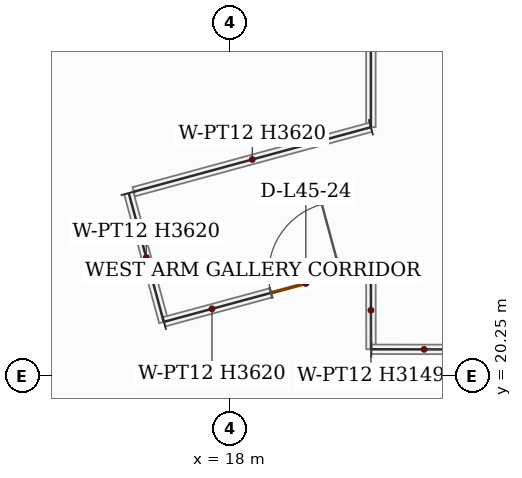
"""IFC4 building model, lengths in metres.
Left out: names, types, materials, properties, quantities, classifications, styles, units other than length and angle.
Written with IfcOpenShell. Run it as: python <this file> out.ifc"""

import sys

from ifc_helpers import new_model, si_unit, direction, frame, frame_2d, origin, place, context, subcontext, project, spatial, rectangle, extrude, source, transform, mapped, element, fill, save


model = new_model("IFC4")
c1 = context("Model", 3, precision=1e-05, world=origin(), true_north=direction((0.0, 1.0)))
c2 = subcontext(c1, "Body", "Model", "MODEL_VIEW")
j1 = project(units=[si_unit("LENGTHUNIT", "METRE"), si_unit("PLANEANGLEUNIT", "RADIAN")], contexts=[c1])
p1 = place(None, origin())
s1 = spatial("IfcSite", under=j1, at=p1, CompositionType="ELEMENT")
p2 = place(p1, origin())
s2 = spatial("IfcBuilding", under=s1, at=p2, CompositionType="ELEMENT")
p3 = place(p2, frame((0.0, 0.0, 194.1)))
s3 = spatial("IfcBuildingStorey", under=s2, at=p3, CompositionType="ELEMENT", Elevation=194.1)
m1 = source(origin(), c2, "Body", "SweptSolid", [
    extrude(rectangle(XDim=1.756, YDim=0.125, at=frame_2d((0.878, 0.0))), origin(), (0.0, 0.0, 1.0), 3.62),
])
p4 = place(p3, frame((16.665, 22.657, 0.0), z_axis=(0.0, 0.0, 1.0), x_axis=(0.262246637243, -0.965000881479, 0.0)))
e1 = element("IfcWall", 1, at=p4, inside=s3, PredefinedType="PARTITIONING", context=c2, shape_type="MappedRepresentation", body=[
    mapped(m1, transform((0.0, 0.0, 0.0), x_axis=(1.0, 0.0, 0.0), y_axis=(0.0, 1.0, 0.0), z_axis=(0.0, 0.0, 1.0), scale=1.0)),
])
p5 = place(p3, frame((17.127, 20.963, 0.0), z_axis=(0.0, 0.0, 1.0), x_axis=(0.965283220267, 0.261205483616, 0.0)))
e2 = element("IfcWall", 2, at=p5, inside=s3, PredefinedType="PARTITIONING", context=c2, shape_type="SweptSolid", body=[
    extrude(rectangle(XDim=2.821, YDim=0.125, at=frame_2d((1.41, 0.0))), origin(), (0.0, 0.0, 1.0), 3.62),
])
p6 = place(p5, frame((1.459, 0.0, 0.0)))
e3 = element("IfcOpeningElement", 3, at=p6, cuts=e2, PredefinedType="OPENING", context=c2, shape_type="SweptSolid", body=[
    extrude(rectangle(XDim=0.95, YDim=2.15, at=frame_2d((0.475, 1.075))), frame((0.0, 0.073, 0.0), z_axis=(0.0, -1.0, 0.0), x_axis=(1.0, 0.0, 0.0)), (0.0, 0.0, 1.0), 0.145),
])
m2 = source(origin(), c2, "Body", "SweptSolid", [
    extrude(rectangle(XDim=1.028, YDim=0.125, at=frame_2d((0.514, 0.0))), origin(), (0.0, 0.0, 1.0), 3.149),
])
p7 = place(p3, frame((19.85, 21.63, 0.0), z_axis=(0.0, 0.0, 1.0), x_axis=(0.001187365584, -0.999999295081, 0.0)))
e4 = element("IfcWall", 4, at=p7, inside=s3, PredefinedType="PARTITIONING", context=c2, shape_type="MappedRepresentation", body=[
    mapped(m2, transform((0.0, 0.0, 0.0), x_axis=(1.0, 0.0, 0.0), y_axis=(0.0, 1.0, 0.0), z_axis=(0.0, 0.0, 1.0), scale=1.0)),
])
m3 = source(origin(), c2, "Body", "SweptSolid", [
    extrude(rectangle(XDim=1.39, YDim=0.125, at=frame_2d((0.695, 0.0))), origin(), (0.0, 0.0, 1.0), 3.62),
])
p8 = place(p3, frame((19.855, 20.602, 0.0), z_axis=(0.0, 0.0, 1.0), x_axis=(0.999998750398, -0.001580886835, 0.0)))
e5 = element("IfcWall", 5, at=p8, inside=s3, PredefinedType="PARTITIONING", context=c2, shape_type="MappedRepresentation", body=[
    mapped(m3, transform((0.0, 0.0, 0.0), x_axis=(1.0, 0.0, 0.0), y_axis=(0.0, 1.0, 0.0), z_axis=(0.0, 0.0, 1.0), scale=1.0)),
])
m4 = source(origin(), c2, "Body", "SweptSolid", [
    extrude(rectangle(XDim=9.809, YDim=0.125, at=frame_2d((4.904, 0.0))), origin(), (0.0, 0.0, 1.0), 2.766),
])
p9 = place(p3, frame((19.85, 33.333, 0.0), z_axis=(0.0, 0.0, 1.0), x_axis=(-2.4890482e-05, -0.99999999969, 0.0)))
e6 = element("IfcWall", 6, at=p9, inside=s3, PredefinedType="PARTITIONING", context=c2, shape_type="MappedRepresentation", body=[
    mapped(m4, transform((0.0, 0.0, 0.0), x_axis=(1.0, 0.0, 0.0), y_axis=(0.0, 1.0, 0.0), z_axis=(0.0, 0.0, 1.0), scale=1.0)),
])
m5 = source(origin(), c2, "Body", "SweptSolid", [
    extrude(rectangle(XDim=3.234, YDim=0.125, at=frame_2d((1.617, 0.0))), origin(), (0.0, 0.0, 1.0), 3.62),
])
p10 = place(p3, frame((19.85, 23.524, 0.0), z_axis=(0.0, 0.0, 1.0), x_axis=(-0.964930881857, -0.262504082327, 0.0)))
e7 = element("IfcWall", 7, at=p10, inside=s3, PredefinedType="PARTITIONING", context=c2, shape_type="MappedRepresentation", body=[
    mapped(m5, transform((0.0, 0.0, 0.0), x_axis=(1.0, 0.0, 0.0), y_axis=(0.0, 1.0, 0.0), z_axis=(0.0, 0.0, 1.0), scale=1.0)),
])
m6 = source(origin(), c2, "Body", "SweptSolid", [
    extrude(rectangle(XDim=0.95, YDim=2.15, at=frame_2d((0.475, 1.075))), frame((0.0, 0.025, 0.0), z_axis=(0.0, -1.0, 0.0), x_axis=(1.0, 0.0, 0.0)), (0.0, 0.0, 1.0), 0.05),
])
p11 = place(p6, origin())
e8 = element("IfcDoor", 8, at=p11, inside=s3, OperationType="SINGLE_SWING_RIGHT", PredefinedType="DOOR", context=c2, shape_type="MappedRepresentation", body=[
    mapped(m6, transform((0.0, 0.0, 0.0), x_axis=(1.0, 0.0, 0.0), y_axis=(0.0, 1.0, 0.0), z_axis=(0.0, 0.0, 1.0), scale=1.0)),
])
fill(e3, e8)
save(model, sys.argv[1])
